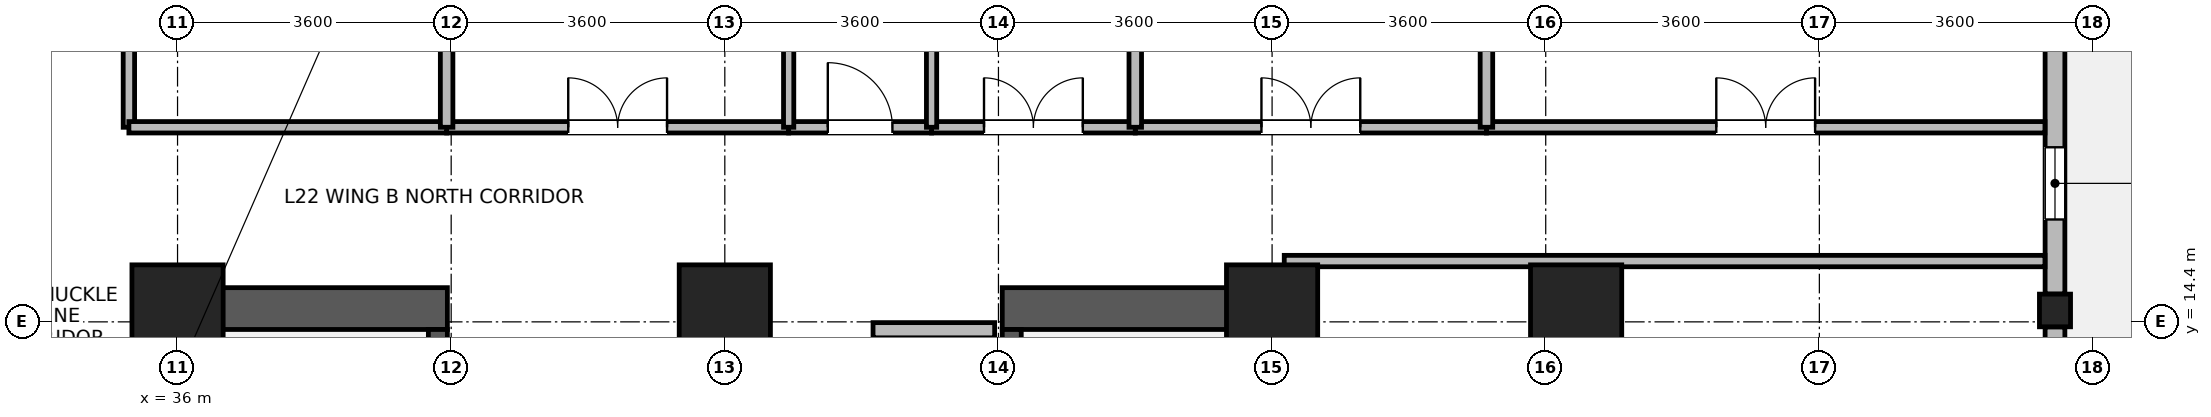
"""IFC4 building model, lengths in metres.
Left out: names, types, materials, properties, quantities, classifications, styles, units other than length and angle.
Written with IfcOpenShell. Run it as: python <this file> out.ifc"""

import sys

from ifc_helpers import new_model, si_unit, direction, frame, frame_2d, origin, origin_2d, place, context, subcontext, project, spatial, rectangle, i_section, extrude, source, transform, mapped, element, fill, save


model = new_model("IFC4")
c1 = context("Model", 3, precision=1e-05, world=origin(), true_north=direction((0.0, 1.0)))
c2 = subcontext(c1, "Body", "Model", "MODEL_VIEW")
j1 = project(units=[si_unit("LENGTHUNIT", "METRE"), si_unit("PLANEANGLEUNIT", "RADIAN")], contexts=[c1])
p1 = place(None, origin())
s1 = spatial("IfcSite", under=j1, at=p1, CompositionType="ELEMENT")
p2 = place(p1, origin())
s2 = spatial("IfcBuilding", under=s1, at=p2, CompositionType="ELEMENT")
p3 = place(p2, frame((0.0, 0.0, 89.7)))
s3 = spatial("IfcBuildingStorey", under=s2, at=p3, CompositionType="ELEMENT", Elevation=89.7)
for number, where, z_axis, x_axis in (
    (1, (36.075, 6.75, 0.0), (0.0, 0.0, 1.0), (0.0, 1.0, 0.0)),
    (2, (50.325, 6.75, 0.0), (0.0, 0.0, 1.0), (0.0, 1.0, 0.0)),
):
    element("IfcWall", number, at=place(p3, frame(where, z_axis=z_axis, x_axis=x_axis)), inside=s3, PredefinedType="SHEAR", context=c2, shape_type="SweptSolid", body=[
        extrude(rectangle(XDim=8.1, YDim=0.55, at=frame_2d((4.05, 0.0))), origin(), (0.0, 0.0, 1.0), 3.45),
    ])
for number, where, z_axis, x_axis in (
    (3, (36.35, 14.575, 0.0), (0.0, 0.0, 1.0), (1.0, 0.0, 0.0)),
    (4, (46.85, 14.575, 0.0), (0.0, 0.0, 1.0), (1.0, 0.0, 0.0)),
):
    element("IfcWall", number, at=place(p3, frame(where, z_axis=z_axis, x_axis=x_axis)), inside=s3, PredefinedType="SHEAR", context=c2, shape_type="SweptSolid", body=[
        extrude(rectangle(XDim=3.2, YDim=0.55, at=frame_2d((1.6, 0.0))), origin(), (0.0, 0.0, 1.0), 3.45),
    ])
p4 = place(p3, frame((39.425, 7.3, 0.0), z_axis=(0.0, 0.0, 1.0), x_axis=(0.0, 1.0, 0.0)))
e5 = element("IfcWall", 5, at=p4, inside=s3, PredefinedType="SHEAR", context=c2, shape_type="SweptSolid", body=[
    extrude(rectangle(XDim=7.0, YDim=0.25, at=frame_2d((3.5, 0.0))), origin(), (0.0, 0.0, 1.0), 3.45),
])
p5 = place(p4, frame((0.15, 0.0, 0.0)))
e6 = element("IfcOpeningElement", 6, at=p5, cuts=e5, PredefinedType="OPENING", context=c2, shape_type="SweptSolid", body=[
    extrude(rectangle(XDim=1.1, YDim=2.08, at=frame_2d((0.55, 1.04))), frame((0.0, 0.135, 0.0), z_axis=(0.0, -1.0, 0.0), x_axis=(1.0, 0.0, 0.0)), (0.0, 0.0, 1.0), 0.27),
])
p6 = place(p3, frame((46.975, 7.3, 0.0), z_axis=(0.0, 0.0, 1.0), x_axis=(0.0, 1.0, 0.0)))
e7 = element("IfcWall", 7, at=p6, inside=s3, PredefinedType="SHEAR", context=c2, shape_type="SweptSolid", body=[
    extrude(rectangle(XDim=7.0, YDim=0.25, at=frame_2d((3.5, 0.0))), origin(), (0.0, 0.0, 1.0), 3.45),
])
p7 = place(p6, frame((0.15, 0.0, 0.0)))
e8 = element("IfcOpeningElement", 8, at=p7, cuts=e7, PredefinedType="OPENING", context=c2, shape_type="SweptSolid", body=[
    extrude(rectangle(XDim=1.1, YDim=2.08, at=frame_2d((0.55, 1.04))), frame((0.0, 0.135, 0.0), z_axis=(0.0, -1.0, 0.0), x_axis=(1.0, 0.0, 0.0)), (0.0, 0.0, 1.0), 0.27),
])
m1 = source(origin(), c2, "Body", "SweptSolid", [
    extrude(rectangle(XDim=1.2, YDim=1.2, at=origin_2d()), origin(), (0.0, 0.0, 1.0), 3.7),
])
for number, where, z_axis, x_axis in (
    (9, (36.0, 14.55, 0.0), (0.0, 0.0, 1.0), (1.0, 0.0, 0.0)),
    (10, (43.2, 14.55, 0.0), (0.0, 0.0, 1.0), (1.0, 0.0, 0.0)),
    (11, (50.4, 14.55, 0.0), (0.0, 0.0, 1.0), (1.0, 0.0, 0.0)),
    (12, (54.4, 14.55, 0.0), (0.0, 0.0, 1.0), (1.0, 0.0, 0.0)),
):
    element("IfcColumn", number, at=place(p3, frame(where, z_axis=z_axis, x_axis=x_axis)), inside=s3, PredefinedType="COLUMN", context=c2, shape_type="MappedRepresentation", body=[
        mapped(m1, transform((0.0, 0.0, 0.0), x_axis=(1.0, 0.0, 0.0), y_axis=(0.0, 1.0, 0.0), z_axis=(0.0, 0.0, 1.0), scale=1.0)),
    ])
m2 = source(origin(), c2, "Body", "SweptSolid", [
    extrude(i_section(OverallWidth=0.409, OverallDepth=0.43, WebThickness=0.024, FlangeThickness=0.033, FilletRadius=0.015, at=origin_2d()), origin(), (0.0, 0.0, 1.0), 3.7),
])
p8 = place(p3, frame((60.7, 14.55, 0.0), z_axis=(0.0, 0.0, 1.0), x_axis=(1.0, 0.0, 0.0)))
e13 = element("IfcColumn", 13, at=p8, inside=s3, PredefinedType="COLUMN", context=c2, shape_type="MappedRepresentation", body=[
    mapped(m2, transform((0.0, 0.0, 0.0), x_axis=(1.0, 0.0, 0.0), y_axis=(0.0, 1.0, 0.0), z_axis=(0.0, 0.0, 1.0), scale=1.0)),
])
p9 = place(p3, frame((60.7, 14.334, 0.0), z_axis=(0.0, 0.0, 1.0), x_axis=(0.0, -1.0, 0.0)))
e14 = element("IfcWall", 14, at=p9, inside=s3, PredefinedType="STANDARD", context=c2, shape_type="SweptSolid", body=[
    extrude(rectangle(XDim=7.068, YDim=0.26, at=frame_2d((3.534, 0.0))), origin(), (0.0, 0.0, 1.0), 2.93),
])
p10 = place(p9, frame((0.867, 0.0, 0.85)))
e15 = element("IfcOpeningElement", 15, at=p10, cuts=e14, PredefinedType="OPENING", context=c2, shape_type="SweptSolid", body=[
    extrude(rectangle(XDim=1.8, YDim=1.85, at=frame_2d((0.9, 0.925))), frame((0.0, 0.14, 0.0), z_axis=(0.0, -1.0, 0.0), x_axis=(1.0, 0.0, 0.0)), (0.0, 0.0, 1.0), 0.28),
])
p11 = place(p9, frame((4.401, 0.0, 0.85)))
e16 = element("IfcOpeningElement", 16, at=p11, cuts=e14, PredefinedType="OPENING", context=c2, shape_type="SweptSolid", body=[
    extrude(rectangle(XDim=1.8, YDim=1.85, at=frame_2d((0.9, 0.925))), frame((0.0, 0.14, 0.0), z_axis=(0.0, -1.0, 0.0), x_axis=(1.0, 0.0, 0.0)), (0.0, 0.0, 1.0), 0.28),
])
p12 = place(p3, frame((60.7, 21.384, 0.0), z_axis=(0.0, 0.0, 1.0), x_axis=(0.0, -1.0, 0.0)))
e17 = element("IfcWall", 17, at=p12, inside=s3, PredefinedType="STANDARD", context=c2, shape_type="SweptSolid", body=[
    extrude(rectangle(XDim=6.618, YDim=0.26, at=frame_2d((3.309, 0.0))), origin(), (0.0, 0.0, 1.0), 2.93),
])
p13 = place(p12, frame((0.754, 0.0, 0.85)))
e18 = element("IfcOpeningElement", 18, at=p13, cuts=e17, PredefinedType="OPENING", context=c2, shape_type="SweptSolid", body=[
    extrude(rectangle(XDim=1.8, YDim=1.85, at=frame_2d((0.9, 0.925))), frame((0.0, 0.14, 0.0), z_axis=(0.0, -1.0, 0.0), x_axis=(1.0, 0.0, 0.0)), (0.0, 0.0, 1.0), 0.28),
])
p14 = place(p12, frame((4.687, 0.0, 0.85)))
e19 = element("IfcOpeningElement", 19, at=p14, cuts=e17, PredefinedType="OPENING", context=c2, shape_type="SweptSolid", body=[
    extrude(rectangle(XDim=0.95, YDim=1.75, at=frame_2d((0.475, 0.875))), frame((0.0, 0.14, 0.0), z_axis=(0.0, -1.0, 0.0), x_axis=(1.0, 0.0, 0.0)), (0.0, 0.0, 1.0), 0.28),
])
p15 = place(p3, frame((45.15, 14.29, 0.0), z_axis=(0.0, 0.0, 1.0), x_axis=(1.0, 0.0, 0.0)))
e20 = element("IfcWall", 20, at=p15, inside=s3, PredefinedType="PARTITIONING", context=c2, shape_type="SweptSolid", body=[
    extrude(rectangle(XDim=1.6, YDim=0.2, at=frame_2d((0.8, 0.0))), origin(), (0.0, 0.0, 1.0), 2.23),
])
p16 = place(p3, frame((50.56, 15.2, 0.0), z_axis=(0.0, 0.0, 1.0), x_axis=(1.0, 0.0, 0.0)))
e21 = element("IfcWall", 21, at=p16, inside=s3, PredefinedType="PARTITIONING", context=c2, shape_type="SweptSolid", body=[
    extrude(rectangle(XDim=10.008, YDim=0.15, at=frame_2d((5.004, 0.0))), origin(), (0.0, 0.0, 1.0), 3.43),
])
p17 = place(p3, frame((35.36, 16.96, 0.0), z_axis=(0.0, 0.0, 1.0), x_axis=(0.0, 1.0, 0.0)))
e22 = element("IfcWall", 22, at=p17, inside=s3, PredefinedType="PARTITIONING", context=c2, shape_type="SweptSolid", body=[
    extrude(rectangle(XDim=9.64, YDim=0.15, at=frame_2d((4.82, 0.0))), origin(), (0.0, 0.0, 1.0), 3.43),
])
p18 = place(p17, frame((2.435, 0.0, 0.0)))
e23 = element("IfcOpeningElement", 23, at=p18, cuts=e22, PredefinedType="OPENING", context=c2, shape_type="SweptSolid", body=[
    extrude(rectangle(XDim=1.3, YDim=2.12, at=frame_2d((0.65, 1.06))), frame((0.0, 0.085, 0.0), z_axis=(0.0, -1.0, 0.0), x_axis=(1.0, 0.0, 0.0)), (0.0, 0.0, 1.0), 0.17),
])
p19 = place(p3, frame((53.22, 16.96, 0.0), z_axis=(0.0, 0.0, 1.0), x_axis=(1.0, 0.0, 0.0)))
e24 = element("IfcWall", 24, at=p19, inside=s3, PredefinedType="PARTITIONING", context=c2, shape_type="SweptSolid", body=[
    extrude(rectangle(XDim=7.348, YDim=0.15, at=frame_2d((3.674, 0.0))), origin(), (0.0, 0.0, 1.0), 3.43),
])
p20 = place(p19, frame((3.024, 0.0, 0.0)))
e25 = element("IfcOpeningElement", 25, at=p20, cuts=e24, PredefinedType="OPENING", context=c2, shape_type="SweptSolid", body=[
    extrude(rectangle(XDim=1.3, YDim=2.12, at=frame_2d((0.65, 1.06))), frame((0.0, 0.085, 0.0), z_axis=(0.0, -1.0, 0.0), x_axis=(1.0, 0.0, 0.0)), (0.0, 0.0, 1.0), 0.17),
])
p21 = place(p3, frame((48.6, 16.96, 0.0), z_axis=(0.0, 0.0, 1.0), x_axis=(1.0, 0.0, 0.0)))
e26 = element("IfcWall", 26, at=p21, inside=s3, PredefinedType="PARTITIONING", context=c2, shape_type="SweptSolid", body=[
    extrude(rectangle(XDim=4.62, YDim=0.15, at=frame_2d((2.31, 0.0))), origin(), (0.0, 0.0, 1.0), 3.43),
])
p22 = place(p21, frame((1.66, 0.0, 0.0)))
e27 = element("IfcOpeningElement", 27, at=p22, cuts=e26, PredefinedType="OPENING", context=c2, shape_type="SweptSolid", body=[
    extrude(rectangle(XDim=1.3, YDim=2.12, at=frame_2d((0.65, 1.06))), frame((0.0, 0.085, 0.0), z_axis=(0.0, -1.0, 0.0), x_axis=(1.0, 0.0, 0.0)), (0.0, 0.0, 1.0), 0.17),
])
p23 = place(p3, frame((39.54, 16.96, 0.0), z_axis=(0.0, 0.0, 1.0), x_axis=(1.0, 0.0, 0.0)))
e28 = element("IfcWall", 28, at=p23, inside=s3, PredefinedType="PARTITIONING", context=c2, shape_type="SweptSolid", body=[
    extrude(rectangle(XDim=4.5, YDim=0.15, at=frame_2d((2.25, 0.0))), origin(), (0.0, 0.0, 1.0), 3.43),
])
p24 = place(p23, frame((1.6, 0.0, 0.0)))
e29 = element("IfcOpeningElement", 29, at=p24, cuts=e28, PredefinedType="OPENING", context=c2, shape_type="SweptSolid", body=[
    extrude(rectangle(XDim=1.3, YDim=2.12, at=frame_2d((0.65, 1.06))), frame((0.0, 0.085, 0.0), z_axis=(0.0, -1.0, 0.0), x_axis=(1.0, 0.0, 0.0)), (0.0, 0.0, 1.0), 0.17),
])
p25 = place(p3, frame((35.36, 16.96, 0.0), z_axis=(0.0, 0.0, 1.0), x_axis=(1.0, 0.0, 0.0)))
e30 = element("IfcWall", 30, at=p25, inside=s3, PredefinedType="PARTITIONING", context=c2, shape_type="SweptSolid", body=[
    extrude(rectangle(XDim=4.18, YDim=0.15, at=frame_2d((2.09, 0.0))), origin(), (0.0, 0.0, 1.0), 3.43),
])
p26 = place(p3, frame((45.92, 16.96, 0.0), z_axis=(0.0, 0.0, 1.0), x_axis=(1.0, 0.0, 0.0)))
e31 = element("IfcWall", 31, at=p26, inside=s3, PredefinedType="PARTITIONING", context=c2, shape_type="SweptSolid", body=[
    extrude(rectangle(XDim=2.68, YDim=0.15, at=frame_2d((1.34, 0.0))), origin(), (0.0, 0.0, 1.0), 3.43),
])
p27 = place(p26, frame((0.69, 0.0, 0.0)))
e32 = element("IfcOpeningElement", 32, at=p27, cuts=e31, PredefinedType="OPENING", context=c2, shape_type="SweptSolid", body=[
    extrude(rectangle(XDim=1.3, YDim=2.12, at=frame_2d((0.65, 1.06))), frame((0.0, 0.085, 0.0), z_axis=(0.0, -1.0, 0.0), x_axis=(1.0, 0.0, 0.0)), (0.0, 0.0, 1.0), 0.17),
])
p28 = place(p3, frame((44.04, 16.96, 0.0), z_axis=(0.0, 0.0, 1.0), x_axis=(1.0, 0.0, 0.0)))
e33 = element("IfcWall", 33, at=p28, inside=s3, PredefinedType="PARTITIONING", context=c2, shape_type="SweptSolid", body=[
    extrude(rectangle(XDim=1.88, YDim=0.15, at=frame_2d((0.94, 0.0))), origin(), (0.0, 0.0, 1.0), 3.43),
])
p29 = place(p28, frame((0.515, 0.0, 0.0)))
e34 = element("IfcOpeningElement", 34, at=p29, cuts=e33, PredefinedType="OPENING", context=c2, shape_type="SweptSolid", body=[
    extrude(rectangle(XDim=0.85, YDim=2.04, at=frame_2d((0.425, 1.02))), frame((0.0, 0.085, 0.0), z_axis=(0.0, -1.0, 0.0), x_axis=(1.0, 0.0, 0.0)), (0.0, 0.0, 1.0), 0.17),
])
p30 = place(p3, frame((39.54, 16.96, 0.0), z_axis=(0.0, 0.0, 1.0), x_axis=(0.0, 1.0, 0.0)))
e35 = element("IfcWall", 35, at=p30, inside=s3, PredefinedType="PARTITIONING", context=c2, shape_type="SweptSolid", body=[
    extrude(rectangle(XDim=9.64, YDim=0.165, at=frame_2d((4.82, 0.0))), origin(), (0.0, 0.0, 1.0), 3.43),
])
for number, where, z_axis, x_axis in (
    (36, (44.04, 16.96, 0.0), (0.0, 0.0, 1.0), (0.0, 1.0, 0.0)),
    (37, (45.92, 16.96, 0.0), (0.0, 0.0, 1.0), (0.0, 1.0, 0.0)),
):
    element("IfcWall", number, at=place(p3, frame(where, z_axis=z_axis, x_axis=x_axis)), inside=s3, PredefinedType="PARTITIONING", context=c2, shape_type="SweptSolid", body=[
        extrude(rectangle(XDim=9.64, YDim=0.135, at=frame_2d((4.82, 0.0))), origin(), (0.0, 0.0, 1.0), 3.43),
    ])
for number, where, z_axis, x_axis in (
    (38, (48.6, 16.96, 0.0), (0.0, 0.0, 1.0), (0.0, 1.0, 0.0)),
    (39, (53.22, 16.96, 0.0), (0.0, 0.0, 1.0), (0.0, 1.0, 0.0)),
):
    element("IfcWall", number, at=place(p3, frame(where, z_axis=z_axis, x_axis=x_axis)), inside=s3, PredefinedType="PARTITIONING", context=c2, shape_type="SweptSolid", body=[
        extrude(rectangle(XDim=9.64, YDim=0.165, at=frame_2d((4.82, 0.0))), origin(), (0.0, 0.0, 1.0), 3.43),
    ])
p31 = place(p14, origin())
e40 = element("IfcWindow", 40, at=p31, inside=s3, PartitioningType="SINGLE_PANEL", PredefinedType="WINDOW", context=c2, shape_type="SweptSolid", body=[
    extrude(rectangle(XDim=0.95, YDim=1.75, at=frame_2d((0.475, 0.875))), frame((0.0, 0.03, 0.0), z_axis=(0.0, -1.0, 0.0), x_axis=(1.0, 0.0, 0.0)), (0.0, 0.0, 1.0), 0.06),
])
fill(e19, e40)
p32 = place(p20, origin())
e41 = element("IfcDoor", 41, at=p32, inside=s3, OperationType="DOUBLE_DOOR_SINGLE_SWING", PredefinedType="DOOR", context=c2, shape_type="SweptSolid", body=[
    extrude(rectangle(XDim=1.3, YDim=2.12, at=frame_2d((0.65, 1.06))), frame((0.0, 0.025, 0.0), z_axis=(0.0, -1.0, 0.0), x_axis=(1.0, 0.0, 0.0)), (0.0, 0.0, 1.0), 0.05),
])
fill(e25, e41)
p33 = place(p22, origin())
e42 = element("IfcDoor", 42, at=p33, inside=s3, OperationType="DOUBLE_DOOR_SINGLE_SWING", PredefinedType="DOOR", context=c2, shape_type="SweptSolid", body=[
    extrude(rectangle(XDim=1.3, YDim=2.12, at=frame_2d((0.65, 1.06))), frame((0.0, 0.025, 0.0), z_axis=(0.0, -1.0, 0.0), x_axis=(1.0, 0.0, 0.0)), (0.0, 0.0, 1.0), 0.05),
])
fill(e27, e42)
p34 = place(p24, origin())
e43 = element("IfcDoor", 43, at=p34, inside=s3, OperationType="DOUBLE_DOOR_SINGLE_SWING", PredefinedType="DOOR", context=c2, shape_type="SweptSolid", body=[
    extrude(rectangle(XDim=1.3, YDim=2.12, at=frame_2d((0.65, 1.06))), frame((0.0, 0.025, 0.0), z_axis=(0.0, -1.0, 0.0), x_axis=(1.0, 0.0, 0.0)), (0.0, 0.0, 1.0), 0.05),
])
fill(e29, e43)
p35 = place(p27, origin())
e44 = element("IfcDoor", 44, at=p35, inside=s3, OperationType="DOUBLE_DOOR_SINGLE_SWING", PredefinedType="DOOR", context=c2, shape_type="SweptSolid", body=[
    extrude(rectangle(XDim=1.3, YDim=2.12, at=frame_2d((0.65, 1.06))), frame((0.0, 0.025, 0.0), z_axis=(0.0, -1.0, 0.0), x_axis=(1.0, 0.0, 0.0)), (0.0, 0.0, 1.0), 0.05),
])
fill(e32, e44)
p36 = place(p29, origin())
e45 = element("IfcDoor", 45, at=p36, inside=s3, OperationType="SINGLE_SWING_LEFT", PredefinedType="DOOR", context=c2, shape_type="SweptSolid", body=[
    extrude(rectangle(XDim=0.85, YDim=2.04, at=frame_2d((0.425, 1.02))), frame((0.0, 0.025, 0.0), z_axis=(0.0, -1.0, 0.0), x_axis=(1.0, 0.0, 0.0)), (0.0, 0.0, 1.0), 0.05),
])
fill(e34, e45)
save(model, sys.argv[1])
